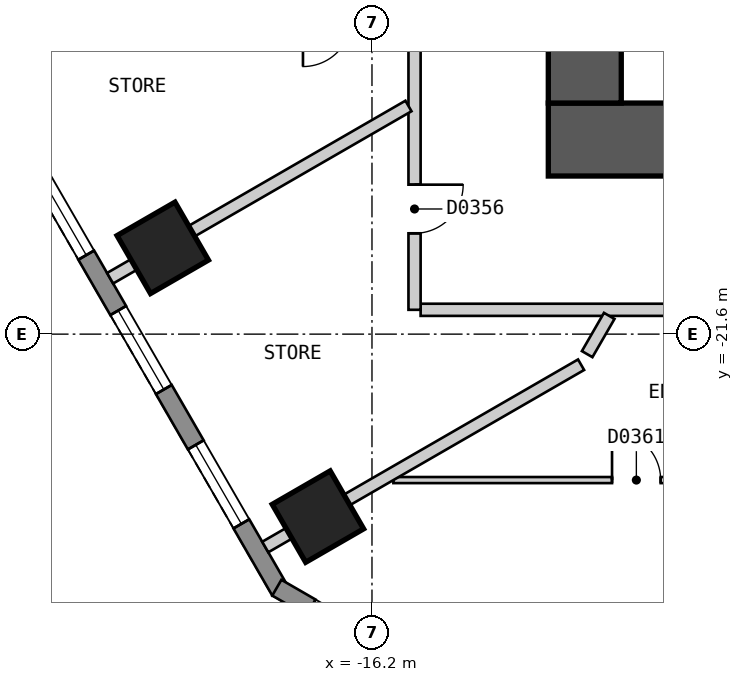
"""IFC4 building model, lengths in metres.
Left out: names, types, materials, properties, quantities, classifications, styles, units other than length and angle.
Written with IfcOpenShell. Run it as: python <this file> out.ifc"""

import sys

from ifc_helpers import new_model, si_unit, direction, frame, frame_2d, origin, origin_2d, place, context, subcontext, project, spatial, polyline, rectangle, outline, extrude, element, fill, save


model = new_model("IFC4")
c1 = context("Model", 3, precision=1e-05, world=origin(), true_north=direction((0.0, 1.0)))
c2 = subcontext(c1, "Body", "Model", "MODEL_VIEW")
j1 = project(units=[si_unit("LENGTHUNIT", "METRE"), si_unit("PLANEANGLEUNIT", "RADIAN")], contexts=[c1])
p1 = place(None, origin())
s1 = spatial("IfcSite", under=j1, at=p1, CompositionType="ELEMENT")
p2 = place(p1, origin())
s2 = spatial("IfcBuilding", under=s1, at=p2, CompositionType="ELEMENT")
p3 = place(p2, frame((0.0, 0.0, 59.4)))
s3 = spatial("IfcBuildingStorey", under=s2, at=p3, CompositionType="ELEMENT", Elevation=59.4)
for number, where, z_axis, x_axis in (
    (1, (-19.641, -20.181, 0.0), (0.0, 0.0, 1.0), (0.5, -0.866, 0.0)),
    (2, (-17.089, -24.601, 0.0), (0.0, 0.0, 1.0), (0.5, -0.866, 0.0)),
):
    element("IfcColumn", number, at=place(p3, frame(where, z_axis=z_axis, x_axis=x_axis)), inside=s3, PredefinedType="COLUMN", context=c2, shape_type="SweptSolid", body=[
        extrude(rectangle(XDim=1.1, YDim=1.1, at=origin_2d()), origin(), (0.0, 0.0, 1.0), 3.0),
    ])
p4 = place(p3, frame((-13.3, -18.4, 0.0), z_axis=(0.0, 0.0, 1.0), x_axis=(1.0, 0.0, 0.0)))
e3 = element("IfcWall", 3, at=p4, inside=s3, PredefinedType="SHEAR", context=c2, shape_type="SweptSolid", body=[
    extrude(rectangle(XDim=26.6, YDim=1.2, at=frame_2d((13.3, 0.0))), origin(), (0.0, 0.0, 1.0), 2.6),
])
p5 = place(p3, frame((-12.7, -17.8, 0.0), z_axis=(0.0, 0.0, 1.0), x_axis=(0.0, 1.0, 0.0)))
e4 = element("IfcWall", 4, at=p5, inside=s3, PredefinedType="SHEAR", context=c2, shape_type="SweptSolid", body=[
    extrude(rectangle(XDim=11.6, YDim=1.2, at=frame_2d((5.8, 0.0))), origin(), (0.0, 0.0, 1.0), 2.6),
])
p6 = place(p5, frame((3.6, 0.0, 0.0)))
e5 = element("IfcOpeningElement", 5, at=p6, cuts=e4, PredefinedType="OPENING", context=c2, shape_type="SweptSolid", body=[
    extrude(rectangle(XDim=1.2, YDim=2.1, at=frame_2d((0.6, 1.05))), frame((0.0, 0.61, 0.0), z_axis=(0.0, -1.0, 0.0), x_axis=(1.0, 0.0, 0.0)), (0.0, 0.0, 1.0), 1.22),
])
p7 = place(p3, frame((-31.22, -2.425, 0.0), z_axis=(0.0, 0.0, 1.0), x_axis=(0.500001938803, -0.866024284413, 0.0)))
e6 = element("IfcWall", 6, at=p7, inside=s3, PredefinedType="SOLIDWALL", context=c2, shape_type="SweptSolid", body=[
    extrude(outline(polyline([(0.0, -0.15), (27.02, -0.15), (26.94, 0.15), (0.08, 0.15), (0.0, -0.15)])), origin(), (0.0, 0.0, 1.0), 2.6),
])
p8 = place(p7, frame((1.277, 0.0, 0.15)))
e7 = element("IfcOpeningElement", 7, at=p8, cuts=e6, PredefinedType="OPENING", context=c2, shape_type="SweptSolid", body=[
    extrude(rectangle(XDim=1.5, YDim=2.1, at=frame_2d((0.75, 1.05))), frame((0.0, 0.16, 0.0), z_axis=(0.0, -1.0, 0.0), x_axis=(1.0, 0.0, 0.0)), (0.0, 0.0, 1.0), 0.32),
])
p9 = place(p7, frame((3.829, 0.0, 0.15)))
e8 = element("IfcOpeningElement", 8, at=p9, cuts=e6, PredefinedType="OPENING", context=c2, shape_type="SweptSolid", body=[
    extrude(rectangle(XDim=1.5, YDim=2.1, at=frame_2d((0.75, 1.05))), frame((0.0, 0.16, 0.0), z_axis=(0.0, -1.0, 0.0), x_axis=(1.0, 0.0, 0.0)), (0.0, 0.0, 1.0), 0.32),
])
p10 = place(p7, frame((6.382, 0.0, 0.15)))
e9 = element("IfcOpeningElement", 9, at=p10, cuts=e6, PredefinedType="OPENING", context=c2, shape_type="SweptSolid", body=[
    extrude(rectangle(XDim=1.5, YDim=2.1, at=frame_2d((0.75, 1.05))), frame((0.0, 0.16, 0.0), z_axis=(0.0, -1.0, 0.0), x_axis=(1.0, 0.0, 0.0)), (0.0, 0.0, 1.0), 0.32),
])
p11 = place(p7, frame((8.933, 0.0, 0.15)))
e10 = element("IfcOpeningElement", 10, at=p11, cuts=e6, PredefinedType="OPENING", context=c2, shape_type="SweptSolid", body=[
    extrude(rectangle(XDim=1.5, YDim=2.1, at=frame_2d((0.75, 1.05))), frame((0.0, 0.16, 0.0), z_axis=(0.0, -1.0, 0.0), x_axis=(1.0, 0.0, 0.0)), (0.0, 0.0, 1.0), 0.32),
])
p12 = place(p7, frame((11.485, 0.0, 0.15)))
e11 = element("IfcOpeningElement", 11, at=p12, cuts=e6, PredefinedType="OPENING", context=c2, shape_type="SweptSolid", body=[
    extrude(rectangle(XDim=1.5, YDim=2.1, at=frame_2d((0.75, 1.05))), frame((0.0, 0.16, 0.0), z_axis=(0.0, -1.0, 0.0), x_axis=(1.0, 0.0, 0.0)), (0.0, 0.0, 1.0), 0.32),
])
p13 = place(p7, frame((14.037, 0.0, 0.15)))
e12 = element("IfcOpeningElement", 12, at=p13, cuts=e6, PredefinedType="OPENING", context=c2, shape_type="SweptSolid", body=[
    extrude(rectangle(XDim=1.5, YDim=2.1, at=frame_2d((0.75, 1.05))), frame((0.0, 0.16, 0.0), z_axis=(0.0, -1.0, 0.0), x_axis=(1.0, 0.0, 0.0)), (0.0, 0.0, 1.0), 0.32),
])
p14 = place(p7, frame((16.589, 0.0, 0.15)))
e13 = element("IfcOpeningElement", 13, at=p14, cuts=e6, PredefinedType="OPENING", context=c2, shape_type="SweptSolid", body=[
    extrude(rectangle(XDim=1.5, YDim=2.1, at=frame_2d((0.75, 1.05))), frame((0.0, 0.16, 0.0), z_axis=(0.0, -1.0, 0.0), x_axis=(1.0, 0.0, 0.0)), (0.0, 0.0, 1.0), 0.32),
])
p15 = place(p7, frame((19.141, 0.0, 0.15)))
e14 = element("IfcOpeningElement", 14, at=p15, cuts=e6, PredefinedType="OPENING", context=c2, shape_type="SweptSolid", body=[
    extrude(rectangle(XDim=1.5, YDim=2.1, at=frame_2d((0.75, 1.05))), frame((0.0, 0.16, 0.0), z_axis=(0.0, -1.0, 0.0), x_axis=(1.0, 0.0, 0.0)), (0.0, 0.0, 1.0), 0.32),
])
p16 = place(p7, frame((21.693, 0.0, 0.15)))
e15 = element("IfcOpeningElement", 15, at=p16, cuts=e6, PredefinedType="OPENING", context=c2, shape_type="SweptSolid", body=[
    extrude(rectangle(XDim=1.5, YDim=2.1, at=frame_2d((0.75, 1.05))), frame((0.0, 0.16, 0.0), z_axis=(0.0, -1.0, 0.0), x_axis=(1.0, 0.0, 0.0)), (0.0, 0.0, 1.0), 0.32),
])
p17 = place(p7, frame((24.244, 0.0, 0.15)))
e16 = element("IfcOpeningElement", 16, at=p17, cuts=e6, PredefinedType="OPENING", context=c2, shape_type="SweptSolid", body=[
    extrude(rectangle(XDim=1.5, YDim=2.1, at=frame_2d((0.75, 1.05))), frame((0.0, 0.16, 0.0), z_axis=(0.0, -1.0, 0.0), x_axis=(1.0, 0.0, 0.0)), (0.0, 0.0, 1.0), 0.32),
])
p18 = place(p3, frame((-17.765, -25.77, 0.0), z_axis=(0.0, 0.0, 1.0), x_axis=(0.866010750942, -0.50002537861, 0.0)))
e17 = element("IfcWall", 17, at=p18, inside=s3, PredefinedType="SOLIDWALL", context=c2, shape_type="SweptSolid", body=[
    extrude(outline(polyline([(0.0, -0.15), (5.0, -0.15), (4.919, 0.15), (0.08, 0.15), (0.0, -0.15)])), origin(), (0.0, 0.0, 1.0), 2.6),
])
p19 = place(p18, frame((0.65, 0.0, 0.15)))
e18 = element("IfcOpeningElement", 18, at=p19, cuts=e17, PredefinedType="OPENING", context=c2, shape_type="SweptSolid", body=[
    extrude(rectangle(XDim=1.2, YDim=2.1, at=frame_2d((0.6, 1.05))), frame((0.0, 0.16, 0.0), z_axis=(0.0, -1.0, 0.0), x_axis=(1.0, 0.0, 0.0)), (0.0, 0.0, 1.0), 0.32),
])
p20 = place(p18, frame((3.15, 0.0, 0.15)))
e19 = element("IfcOpeningElement", 19, at=p20, cuts=e17, PredefinedType="OPENING", context=c2, shape_type="SweptSolid", body=[
    extrude(rectangle(XDim=1.2, YDim=2.1, at=frame_2d((0.6, 1.05))), frame((0.0, 0.16, 0.0), z_axis=(0.0, -1.0, 0.0), x_axis=(1.0, 0.0, 0.0)), (0.0, 0.0, 1.0), 0.32),
])
p21 = place(p3, frame((-15.4, -21.2, 0.0), z_axis=(0.0, 0.0, 1.0), x_axis=(1.0, 0.0, 0.0)))
e20 = element("IfcWall", 20, at=p21, inside=s3, PredefinedType="PARTITIONING", context=c2, shape_type="SweptSolid", body=[
    extrude(rectangle(XDim=30.799, YDim=0.2, at=frame_2d((15.399, 0.0))), origin(), (0.0, 0.0, 1.0), 2.6),
])
p22 = place(p21, frame((9.797, 0.0, 0.0)))
e21 = element("IfcOpeningElement", 21, at=p22, cuts=e20, PredefinedType="OPENING", context=c2, shape_type="SweptSolid", body=[
    extrude(rectangle(XDim=1.0, YDim=2.1, at=frame_2d((0.5, 1.05))), frame((0.0, 0.11, 0.0), z_axis=(0.0, -1.0, 0.0), x_axis=(1.0, 0.0, 0.0)), (0.0, 0.0, 1.0), 0.22),
])
p23 = place(p21, frame((14.901, 0.0, 0.0)))
e22 = element("IfcOpeningElement", 22, at=p23, cuts=e20, PredefinedType="OPENING", context=c2, shape_type="SweptSolid", body=[
    extrude(rectangle(XDim=1.0, YDim=2.1, at=frame_2d((0.5, 1.05))), frame((0.0, 0.11, 0.0), z_axis=(0.0, -1.0, 0.0), x_axis=(1.0, 0.0, 0.0)), (0.0, 0.0, 1.0), 0.22),
])
p24 = place(p21, frame((24.916, 0.0, 0.0)))
e23 = element("IfcOpeningElement", 23, at=p24, cuts=e20, PredefinedType="OPENING", context=c2, shape_type="SweptSolid", body=[
    extrude(rectangle(XDim=0.9, YDim=2.1, at=frame_2d((0.45, 1.05))), frame((0.0, 0.11, 0.0), z_axis=(0.0, -1.0, 0.0), x_axis=(1.0, 0.0, 0.0)), (0.0, 0.0, 1.0), 0.22),
])
p25 = place(p3, frame((-15.5, -21.2, 0.0), z_axis=(0.0, 0.0, 1.0), x_axis=(0.0, 1.0, 0.0)))
e24 = element("IfcWall", 24, at=p25, inside=s3, PredefinedType="PARTITIONING", context=c2, shape_type="SweptSolid", body=[
    extrude(rectangle(XDim=4.8, YDim=0.2, at=frame_2d((2.4, 0.0))), origin(), (0.0, 0.0, 1.0), 2.6),
])
p26 = place(p25, frame((1.258, 0.0, 0.0)))
e25 = element("IfcOpeningElement", 25, at=p26, cuts=e24, PredefinedType="OPENING", context=c2, shape_type="SweptSolid", body=[
    extrude(rectangle(XDim=0.8, YDim=2.1, at=frame_2d((0.4, 1.05))), frame((0.0, 0.11, 0.0), z_axis=(0.0, -1.0, 0.0), x_axis=(1.0, 0.0, 0.0)), (0.0, 0.0, 1.0), 0.22),
])
p27 = place(p3, frame((-15.848, -24.0, 0.0), z_axis=(0.0, 0.0, 1.0), x_axis=(1.0, 0.0, 0.0)))
e26 = element("IfcWall", 26, at=p27, inside=s3, PredefinedType="PARTITIONING", context=c2, shape_type="SweptSolid", body=[
    extrude(rectangle(XDim=8.143, YDim=0.1, at=frame_2d((4.071, 0.0))), origin(), (0.0, 0.0, 1.0), 2.6),
])
p28 = place(p27, frame((3.596, 0.0, 0.0)))
e27 = element("IfcOpeningElement", 27, at=p28, cuts=e26, PredefinedType="OPENING", context=c2, shape_type="SweptSolid", body=[
    extrude(rectangle(XDim=0.8, YDim=2.1, at=frame_2d((0.4, 1.05))), frame((0.0, 0.06, 0.0), z_axis=(0.0, -1.0, 0.0), x_axis=(1.0, 0.0, 0.0)), (0.0, 0.0, 1.0), 0.12),
])
p29 = place(p3, frame((-12.661, -21.929, 0.0), z_axis=(0.0, 0.0, 1.0), x_axis=(0.499683639304, 0.866207977689, 0.0)))
e28 = element("IfcWall", 28, at=p29, inside=s3, PredefinedType="PARTITIONING", context=c2, shape_type="SweptSolid", body=[
    extrude(rectangle(XDim=0.726, YDim=0.2, at=frame_2d((0.363, 0.0))), origin(), (0.0, 0.0, 1.0), 2.6),
])
p30 = place(p3, frame((-20.507, -20.681, 0.0), z_axis=(0.0, 0.0, 1.0), x_axis=(0.866028446103, 0.499994730513, 0.0)))
e29 = element("IfcWall", 29, at=p30, inside=s3, PredefinedType="PARTITIONING", context=c2, shape_type="SweptSolid", body=[
    extrude(rectangle(XDim=5.666, YDim=0.2, at=frame_2d((2.833, 0.0))), origin(), (0.0, 0.0, 1.0), 2.6),
])
p31 = place(p3, frame((-17.955, -25.101, 0.0), z_axis=(0.0, 0.0, 1.0), x_axis=(0.866080519133, 0.499904525262, 0.0)))
e30 = element("IfcWall", 30, at=p31, inside=s3, PredefinedType="PARTITIONING", context=c2, shape_type="SweptSolid", body=[
    extrude(rectangle(XDim=5.997, YDim=0.2, at=frame_2d((2.999, 0.0))), origin(), (0.0, 0.0, 1.0), 2.6),
])
p32 = place(p15, origin())
e31 = element("IfcWindow", 31, at=p32, inside=s3, PartitioningType="SINGLE_PANEL", PredefinedType="WINDOW", context=c2, shape_type="SweptSolid", body=[
    extrude(rectangle(XDim=1.5, YDim=2.1, at=frame_2d((0.75, 1.05))), frame((0.0, 0.03, 0.0), z_axis=(0.0, -1.0, 0.0), x_axis=(1.0, 0.0, 0.0)), (0.0, 0.0, 1.0), 0.06),
])
fill(e14, e31)
p33 = place(p16, origin())
e32 = element("IfcWindow", 32, at=p33, inside=s3, PartitioningType="SINGLE_PANEL", PredefinedType="WINDOW", context=c2, shape_type="SweptSolid", body=[
    extrude(rectangle(XDim=1.5, YDim=2.1, at=frame_2d((0.75, 1.05))), frame((0.0, 0.03, 0.0), z_axis=(0.0, -1.0, 0.0), x_axis=(1.0, 0.0, 0.0)), (0.0, 0.0, 1.0), 0.06),
])
fill(e15, e32)
p34 = place(p17, origin())
e33 = element("IfcWindow", 33, at=p34, inside=s3, PartitioningType="SINGLE_PANEL", PredefinedType="WINDOW", context=c2, shape_type="SweptSolid", body=[
    extrude(rectangle(XDim=1.5, YDim=2.1, at=frame_2d((0.75, 1.05))), frame((0.0, 0.03, 0.0), z_axis=(0.0, -1.0, 0.0), x_axis=(1.0, 0.0, 0.0)), (0.0, 0.0, 1.0), 0.06),
])
fill(e16, e33)
p35 = place(p26, origin())
e34 = element("IfcDoor", 34, at=p35, inside=s3, OperationType="SINGLE_SWING_RIGHT", PredefinedType="DOOR", context=c2, shape_type="SweptSolid", body=[
    extrude(rectangle(XDim=0.8, YDim=2.1, at=frame_2d((0.4, 1.05))), frame((0.0, 0.025, 0.0), z_axis=(0.0, -1.0, 0.0), x_axis=(1.0, 0.0, 0.0)), (0.0, 0.0, 1.0), 0.05),
])
fill(e25, e34)
p36 = place(p28, origin())
e35 = element("IfcDoor", 35, at=p36, inside=s3, OperationType="SINGLE_SWING_LEFT", PredefinedType="DOOR", context=c2, shape_type="SweptSolid", body=[
    extrude(rectangle(XDim=0.8, YDim=2.1, at=frame_2d((0.4, 1.05))), frame((0.0, 0.025, 0.0), z_axis=(0.0, -1.0, 0.0), x_axis=(1.0, 0.0, 0.0)), (0.0, 0.0, 1.0), 0.05),
])
fill(e27, e35)
save(model, sys.argv[1])
